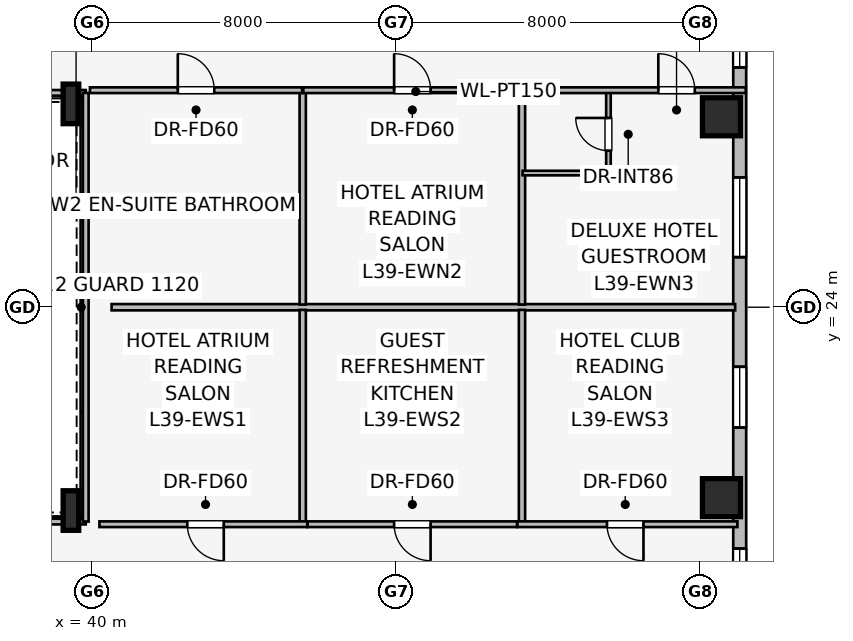
"""IFC4 building model, lengths in metres.
Left out: names, types, materials, properties, quantities, classifications, styles, units other than length and angle.
Written with IfcOpenShell. Run it as: python <this file> out.ifc"""

import sys

from ifc_helpers import new_model, si_unit, direction, frame, frame_2d, origin, origin_2d, place, context, subcontext, project, spatial, rectangle, i_section, extrude, element, fill, save


model = new_model("IFC4")
c1 = context("Model", 3, precision=1e-05, world=origin(), true_north=direction((0.0, 1.0)))
c2 = subcontext(c1, "Body", "Model", "MODEL_VIEW")
j1 = project(units=[si_unit("LENGTHUNIT", "METRE"), si_unit("PLANEANGLEUNIT", "RADIAN")], contexts=[c1])
p1 = place(None, origin())
s1 = spatial("IfcSite", under=j1, at=p1, CompositionType="ELEMENT")
p2 = place(p1, origin())
s2 = spatial("IfcBuilding", under=s1, at=p2, CompositionType="ELEMENT")
p3 = place(p2, frame((0.0, 0.0, 146.4)))
s3 = spatial("IfcBuildingStorey", under=s2, at=p3, CompositionType="ELEMENT", Elevation=146.4)
for number, where, z_axis, x_axis in (
    (1, (56.568, 18.989, 0.0), (0.0, 0.0, 1.0), (1.0, 0.0, 0.0)),
    (2, (56.568, 29.011, 0.0), (0.0, 0.0, 1.0), (1.0, 0.0, 0.0)),
):
    element("IfcColumn", number, at=place(p3, frame(where, z_axis=z_axis, x_axis=x_axis)), inside=s3, PredefinedType="COLUMN", context=c2, shape_type="SweptSolid", body=[
        extrude(rectangle(XDim=1.0, YDim=1.0, at=origin_2d()), origin(), (0.0, 0.0, 1.0), 3.45),
    ])
for number, where, z_axis, x_axis in (
    (3, (39.45, 18.65, 0.0), (0.0, 0.0, 1.0), (1.0, 0.0, 0.0)),
    (4, (39.45, 29.35, 0.0), (0.0, 0.0, 1.0), (1.0, 0.0, 0.0)),
):
    element("IfcColumn", number, at=place(p3, frame(where, z_axis=z_axis, x_axis=x_axis)), inside=s3, PredefinedType="COLUMN", context=c2, shape_type="SweptSolid", body=[
        extrude(i_section(OverallWidth=0.41, OverallDepth=1.041, WebThickness=0.031, FlangeThickness=0.056, at=origin_2d()), origin(), (0.0, 0.0, 1.0), 3.45),
    ])
p4 = place(p3, frame((57.048, 32.352, 0.0), z_axis=(0.0, 0.0, 1.0), x_axis=(0.0, -1.0, 0.0)))
e5 = element("IfcWall", 5, at=p4, inside=s3, PredefinedType="STANDARD", context=c2, shape_type="SweptSolid", body=[
    extrude(rectangle(XDim=16.704, YDim=0.34, at=frame_2d((8.352, 0.0))), origin(), (0.0, 0.0, 1.0), 3.19),
])
p5 = place(p4, frame((0.992, 0.0, 0.75)))
e6 = element("IfcOpeningElement", 6, at=p5, cuts=e5, PredefinedType="OPENING", context=c2, shape_type="SweptSolid", body=[
    extrude(rectangle(XDim=1.05, YDim=1.4, at=frame_2d((0.525, 0.7))), frame((0.0, 0.18, 0.0), z_axis=(0.0, -1.0, 0.0), x_axis=(1.0, 0.0, 0.0)), (0.0, 0.0, 1.0), 0.36),
])
p6 = place(p4, frame((4.935, 0.0, 0.75)))
e7 = element("IfcOpeningElement", 7, at=p6, cuts=e5, PredefinedType="OPENING", context=c2, shape_type="SweptSolid", body=[
    extrude(rectangle(XDim=2.1, YDim=1.5, at=frame_2d((1.05, 0.75))), frame((0.0, 0.18, 0.0), z_axis=(0.0, -1.0, 0.0), x_axis=(1.0, 0.0, 0.0)), (0.0, 0.0, 1.0), 0.36),
])
p7 = place(p4, frame((9.919, 0.0, 0.75)))
e8 = element("IfcOpeningElement", 8, at=p7, cuts=e5, PredefinedType="OPENING", context=c2, shape_type="SweptSolid", body=[
    extrude(rectangle(XDim=1.6, YDim=1.55, at=frame_2d((0.8, 0.775))), frame((0.0, 0.18, 0.0), z_axis=(0.0, -1.0, 0.0), x_axis=(1.0, 0.0, 0.0)), (0.0, 0.0, 1.0), 0.36),
])
p8 = place(p4, frame((14.702, 0.0, 0.75)))
e9 = element("IfcOpeningElement", 9, at=p8, cuts=e5, PredefinedType="OPENING", context=c2, shape_type="SweptSolid", body=[
    extrude(rectangle(XDim=1.05, YDim=1.4, at=frame_2d((0.525, 0.7))), frame((0.0, 0.18, 0.0), z_axis=(0.0, -1.0, 0.0), x_axis=(1.0, 0.0, 0.0)), (0.0, 0.0, 1.0), 0.36),
])
p9 = place(p3, frame((27.675, 18.36, 0.0), z_axis=(0.0, 0.0, 1.0), x_axis=(1.0, 0.0, 0.0)))
e10 = element("IfcWall", 10, at=p9, inside=s3, PredefinedType="PARTITIONING", context=c2, shape_type="SweptSolid", body=[
    extrude(rectangle(XDim=12.165, YDim=0.15, at=frame_2d((6.083, 0.0))), origin(), (0.0, 0.0, 1.0), 2.331),
])
p10 = place(p3, frame((39.84, 29.64, 0.0), z_axis=(0.0, 0.0, 1.0), x_axis=(-1.0, 0.0, 0.0)))
e11 = element("IfcWall", 11, at=p10, inside=s3, PredefinedType="PARTITIONING", context=c2, shape_type="SweptSolid", body=[
    extrude(rectangle(XDim=12.2, YDim=0.15, at=frame_2d((6.1, 0.0))), origin(), (0.0, 0.0, 1.0), 2.331),
])
p11 = place(p3, frame((39.84, 18.36, 0.0), z_axis=(0.0, 0.0, 1.0), x_axis=(0.0, 1.0, 0.0)))
e12 = element("IfcWall", 12, at=p11, inside=s3, PredefinedType="PARTITIONING", context=c2, shape_type="SweptSolid", body=[
    extrude(rectangle(XDim=11.28, YDim=0.15, at=frame_2d((5.64, 0.0))), origin(), (0.0, 0.0, 1.0), 3.19),
])
p12 = place(p3, frame((40.52, 24.0, 0.0), z_axis=(0.0, 0.0, 1.0), x_axis=(1.0, 0.0, 0.0)))
e13 = element("IfcWall", 13, at=p12, inside=s3, PredefinedType="PARTITIONING", context=c2, shape_type="SweptSolid", body=[
    extrude(rectangle(XDim=16.408, YDim=0.165, at=frame_2d((8.204, 0.0))), origin(), (0.0, 0.0, 1.0), 3.19),
])
for number, where, z_axis, x_axis in (
    (14, (45.549, 24.07, 0.0), (0.0, 0.0, 1.0), (0.0, 1.0, 0.0)),
    (15, (51.319, 24.07, 0.0), (0.0, 0.0, 1.0), (0.0, 1.0, 0.0)),
):
    element("IfcWall", number, at=place(p3, frame(where, z_axis=z_axis, x_axis=x_axis)), inside=s3, PredefinedType="PARTITIONING", context=c2, shape_type="SweptSolid", body=[
        extrude(rectangle(XDim=5.64, YDim=0.165, at=frame_2d((2.82, 0.0))), origin(), (0.0, 0.0, 1.0), 3.19),
    ])
p13 = place(p3, frame((39.95, 29.71, 0.0), z_axis=(0.0, 0.0, 1.0), x_axis=(1.0, 0.0, 0.0)))
e16 = element("IfcWall", 16, at=p13, inside=s3, PredefinedType="PARTITIONING", context=c2, shape_type="SweptSolid", body=[
    extrude(rectangle(XDim=5.584, YDim=0.15, at=frame_2d((2.792, 0.0))), origin(), (0.0, 0.0, 1.0), 3.19),
])
p14 = place(p13, frame((2.312, 0.0, 0.0)))
e17 = element("IfcOpeningElement", 17, at=p14, cuts=e16, PredefinedType="OPENING", context=c2, shape_type="SweptSolid", body=[
    extrude(rectangle(XDim=0.96, YDim=2.0, at=frame_2d((0.48, 1.0))), frame((0.0, 0.085, 0.0), z_axis=(0.0, -1.0, 0.0), x_axis=(1.0, 0.0, 0.0)), (0.0, 0.0, 1.0), 0.17),
])
p15 = place(p3, frame((45.564, 29.71, 0.0), z_axis=(0.0, 0.0, 1.0), x_axis=(1.0, 0.0, 0.0)))
e18 = element("IfcWall", 18, at=p15, inside=s3, PredefinedType="PARTITIONING", context=c2, shape_type="SweptSolid", body=[
    extrude(rectangle(XDim=5.74, YDim=0.15, at=frame_2d((2.87, 0.0))), origin(), (0.0, 0.0, 1.0), 3.19),
])
p16 = place(p15, frame((2.39, 0.0, 0.0)))
e19 = element("IfcOpeningElement", 19, at=p16, cuts=e18, PredefinedType="OPENING", context=c2, shape_type="SweptSolid", body=[
    extrude(rectangle(XDim=0.96, YDim=2.0, at=frame_2d((0.48, 1.0))), frame((0.0, 0.085, 0.0), z_axis=(0.0, -1.0, 0.0), x_axis=(1.0, 0.0, 0.0)), (0.0, 0.0, 1.0), 0.17),
])
p17 = place(p3, frame((53.594, 27.47, 0.0), z_axis=(0.0, 0.0, 1.0), x_axis=(0.0, 1.0, 0.0)))
e20 = element("IfcWall", 20, at=p17, inside=s3, PredefinedType="PARTITIONING", context=c2, shape_type="SweptSolid", body=[
    extrude(rectangle(XDim=2.24, YDim=0.12, at=frame_2d((1.12, 0.0))), origin(), (0.0, 0.0, 1.0), 3.19),
])
p18 = place(p17, frame((0.65, 0.0, 0.0)))
e21 = element("IfcOpeningElement", 21, at=p18, cuts=e20, PredefinedType="OPENING", context=c2, shape_type="SweptSolid", body=[
    extrude(rectangle(XDim=0.86, YDim=2.0, at=frame_2d((0.43, 1.0))), frame((0.0, 0.07, 0.0), z_axis=(0.0, -1.0, 0.0), x_axis=(1.0, 0.0, 0.0)), (0.0, 0.0, 1.0), 0.14),
])
p19 = place(p3, frame((51.334, 27.53, 0.0), z_axis=(0.0, 0.0, 1.0), x_axis=(1.0, 0.0, 0.0)))
e22 = element("IfcWall", 22, at=p19, inside=s3, PredefinedType="PARTITIONING", context=c2, shape_type="SweptSolid", body=[
    extrude(rectangle(XDim=2.32, YDim=0.12, at=frame_2d((1.16, 0.0))), origin(), (0.0, 0.0, 1.0), 3.19),
])
p20 = place(p3, frame((51.334, 29.71, 0.0), z_axis=(0.0, 0.0, 1.0), x_axis=(1.0, 0.0, 0.0)))
e23 = element("IfcWall", 23, at=p20, inside=s3, PredefinedType="PARTITIONING", context=c2, shape_type="SweptSolid", body=[
    extrude(rectangle(XDim=5.874, YDim=0.15, at=frame_2d((2.937, 0.0))), origin(), (0.0, 0.0, 1.0), 3.19),
])
p21 = place(p20, frame((3.572, 0.0, 0.0)))
e24 = element("IfcOpeningElement", 24, at=p21, cuts=e23, PredefinedType="OPENING", context=c2, shape_type="SweptSolid", body=[
    extrude(rectangle(XDim=0.96, YDim=2.0, at=frame_2d((0.48, 1.0))), frame((0.0, 0.085, 0.0), z_axis=(0.0, -1.0, 0.0), x_axis=(1.0, 0.0, 0.0)), (0.0, 0.0, 1.0), 0.17),
])
for number, where, z_axis, x_axis in (
    (25, (45.549, 18.29, 0.0), (0.0, 0.0, 1.0), (0.0, 1.0, 0.0)),
    (26, (51.319, 18.29, 0.0), (0.0, 0.0, 1.0), (0.0, 1.0, 0.0)),
):
    element("IfcWall", number, at=place(p3, frame(where, z_axis=z_axis, x_axis=x_axis)), inside=s3, PredefinedType="PARTITIONING", context=c2, shape_type="SweptSolid", body=[
        extrude(rectangle(XDim=5.64, YDim=0.165, at=frame_2d((2.82, 0.0))), origin(), (0.0, 0.0, 1.0), 3.19),
    ])
p22 = place(p3, frame((45.669, 18.29, 0.0), z_axis=(0.0, 0.0, 1.0), x_axis=(-1.0, 0.0, 0.0)))
e27 = element("IfcWall", 27, at=p22, inside=s3, PredefinedType="PARTITIONING", context=c2, shape_type="SweptSolid", body=[
    extrude(rectangle(XDim=5.469, YDim=0.15, at=frame_2d((2.734, 0.0))), origin(), (0.0, 0.0, 1.0), 3.19),
])
p23 = place(p22, frame((2.197, 0.0, 0.0)))
e28 = element("IfcOpeningElement", 28, at=p23, cuts=e27, PredefinedType="OPENING", context=c2, shape_type="SweptSolid", body=[
    extrude(rectangle(XDim=0.96, YDim=2.0, at=frame_2d((0.48, 1.0))), frame((0.0, 0.085, 0.0), z_axis=(0.0, -1.0, 0.0), x_axis=(1.0, 0.0, 0.0)), (0.0, 0.0, 1.0), 0.17),
])
p24 = place(p3, frame((51.189, 18.29, 0.0), z_axis=(0.0, 0.0, 1.0), x_axis=(-1.0, 0.0, 0.0)))
e29 = element("IfcWall", 29, at=p24, inside=s3, PredefinedType="PARTITIONING", context=c2, shape_type="SweptSolid", body=[
    extrude(rectangle(XDim=5.51, YDim=0.15, at=frame_2d((2.755, 0.0))), origin(), (0.0, 0.0, 1.0), 3.19),
])
p25 = place(p24, frame((2.275, 0.0, 0.0)))
e30 = element("IfcOpeningElement", 30, at=p25, cuts=e29, PredefinedType="OPENING", context=c2, shape_type="SweptSolid", body=[
    extrude(rectangle(XDim=0.96, YDim=2.0, at=frame_2d((0.48, 1.0))), frame((0.0, 0.085, 0.0), z_axis=(0.0, -1.0, 0.0), x_axis=(1.0, 0.0, 0.0)), (0.0, 0.0, 1.0), 0.17),
])
p26 = place(p3, frame((56.988, 18.29, 0.0), z_axis=(0.0, 0.0, 1.0), x_axis=(-1.0, 0.0, 0.0)))
e31 = element("IfcWall", 31, at=p26, inside=s3, PredefinedType="PARTITIONING", context=c2, shape_type="SweptSolid", body=[
    extrude(rectangle(XDim=5.789, YDim=0.15, at=frame_2d((2.895, 0.0))), origin(), (0.0, 0.0, 1.0), 3.19),
])
p27 = place(p26, frame((2.472, 0.0, 0.0)))
e32 = element("IfcOpeningElement", 32, at=p27, cuts=e31, PredefinedType="OPENING", context=c2, shape_type="SweptSolid", body=[
    extrude(rectangle(XDim=0.96, YDim=2.0, at=frame_2d((0.48, 1.0))), frame((0.0, 0.085, 0.0), z_axis=(0.0, -1.0, 0.0), x_axis=(1.0, 0.0, 0.0)), (0.0, 0.0, 1.0), 0.17),
])
p28 = place(p5, origin())
e33 = element("IfcWindow", 33, at=p28, inside=s3, PartitioningType="SINGLE_PANEL", PredefinedType="WINDOW", context=c2, shape_type="SweptSolid", body=[
    extrude(rectangle(XDim=1.05, YDim=1.4, at=frame_2d((0.525, 0.7))), frame((0.0, 0.03, 0.0), z_axis=(0.0, -1.0, 0.0), x_axis=(1.0, 0.0, 0.0)), (0.0, 0.0, 1.0), 0.06),
])
fill(e6, e33)
p29 = place(p6, origin())
e34 = element("IfcWindow", 34, at=p29, inside=s3, PartitioningType="SINGLE_PANEL", PredefinedType="WINDOW", context=c2, shape_type="SweptSolid", body=[
    extrude(rectangle(XDim=2.1, YDim=1.5, at=frame_2d((1.05, 0.75))), frame((0.0, 0.03, 0.0), z_axis=(0.0, -1.0, 0.0), x_axis=(1.0, 0.0, 0.0)), (0.0, 0.0, 1.0), 0.06),
])
fill(e7, e34)
p30 = place(p7, origin())
e35 = element("IfcWindow", 35, at=p30, inside=s3, PartitioningType="SINGLE_PANEL", PredefinedType="WINDOW", context=c2, shape_type="SweptSolid", body=[
    extrude(rectangle(XDim=1.6, YDim=1.55, at=frame_2d((0.8, 0.775))), frame((0.0, 0.03, 0.0), z_axis=(0.0, -1.0, 0.0), x_axis=(1.0, 0.0, 0.0)), (0.0, 0.0, 1.0), 0.06),
])
fill(e8, e35)
p31 = place(p8, origin())
e36 = element("IfcWindow", 36, at=p31, inside=s3, PartitioningType="SINGLE_PANEL", PredefinedType="WINDOW", context=c2, shape_type="SweptSolid", body=[
    extrude(rectangle(XDim=1.05, YDim=1.4, at=frame_2d((0.525, 0.7))), frame((0.0, 0.03, 0.0), z_axis=(0.0, -1.0, 0.0), x_axis=(1.0, 0.0, 0.0)), (0.0, 0.0, 1.0), 0.06),
])
fill(e9, e36)
p32 = place(p14, origin())
e37 = element("IfcDoor", 37, at=p32, inside=s3, OperationType="SINGLE_SWING_LEFT", PredefinedType="DOOR", context=c2, shape_type="SweptSolid", body=[
    extrude(rectangle(XDim=0.96, YDim=2.0, at=frame_2d((0.48, 1.0))), frame((0.0, 0.025, 0.0), z_axis=(0.0, -1.0, 0.0), x_axis=(1.0, 0.0, 0.0)), (0.0, 0.0, 1.0), 0.05),
])
fill(e17, e37)
p33 = place(p16, origin())
e38 = element("IfcDoor", 38, at=p33, inside=s3, OperationType="SINGLE_SWING_LEFT", PredefinedType="DOOR", context=c2, shape_type="SweptSolid", body=[
    extrude(rectangle(XDim=0.96, YDim=2.0, at=frame_2d((0.48, 1.0))), frame((0.0, 0.025, 0.0), z_axis=(0.0, -1.0, 0.0), x_axis=(1.0, 0.0, 0.0)), (0.0, 0.0, 1.0), 0.05),
])
fill(e19, e38)
p34 = place(p18, origin())
e39 = element("IfcDoor", 39, at=p34, inside=s3, OperationType="SINGLE_SWING_RIGHT", PredefinedType="DOOR", context=c2, shape_type="SweptSolid", body=[
    extrude(rectangle(XDim=0.86, YDim=2.0, at=frame_2d((0.43, 1.0))), frame((0.0, 0.025, 0.0), z_axis=(0.0, -1.0, 0.0), x_axis=(1.0, 0.0, 0.0)), (0.0, 0.0, 1.0), 0.05),
])
fill(e21, e39)
p35 = place(p21, origin())
e40 = element("IfcDoor", 40, at=p35, inside=s3, OperationType="SINGLE_SWING_LEFT", PredefinedType="DOOR", context=c2, shape_type="SweptSolid", body=[
    extrude(rectangle(XDim=0.96, YDim=2.0, at=frame_2d((0.48, 1.0))), frame((0.0, 0.025, 0.0), z_axis=(0.0, -1.0, 0.0), x_axis=(1.0, 0.0, 0.0)), (0.0, 0.0, 1.0), 0.05),
])
fill(e24, e40)
p36 = place(p23, origin())
e41 = element("IfcDoor", 41, at=p36, inside=s3, OperationType="SINGLE_SWING_LEFT", PredefinedType="DOOR", context=c2, shape_type="SweptSolid", body=[
    extrude(rectangle(XDim=0.96, YDim=2.0, at=frame_2d((0.48, 1.0))), frame((0.0, 0.025, 0.0), z_axis=(0.0, -1.0, 0.0), x_axis=(1.0, 0.0, 0.0)), (0.0, 0.0, 1.0), 0.05),
])
fill(e28, e41)
p37 = place(p25, origin())
e42 = element("IfcDoor", 42, at=p37, inside=s3, OperationType="SINGLE_SWING_LEFT", PredefinedType="DOOR", context=c2, shape_type="SweptSolid", body=[
    extrude(rectangle(XDim=0.96, YDim=2.0, at=frame_2d((0.48, 1.0))), frame((0.0, 0.025, 0.0), z_axis=(0.0, -1.0, 0.0), x_axis=(1.0, 0.0, 0.0)), (0.0, 0.0, 1.0), 0.05),
])
fill(e30, e42)
p38 = place(p27, origin())
e43 = element("IfcDoor", 43, at=p38, inside=s3, OperationType="SINGLE_SWING_LEFT", PredefinedType="DOOR", context=c2, shape_type="SweptSolid", body=[
    extrude(rectangle(XDim=0.96, YDim=2.0, at=frame_2d((0.48, 1.0))), frame((0.0, 0.025, 0.0), z_axis=(0.0, -1.0, 0.0), x_axis=(1.0, 0.0, 0.0)), (0.0, 0.0, 1.0), 0.05),
])
fill(e32, e43)
save(model, sys.argv[1])
